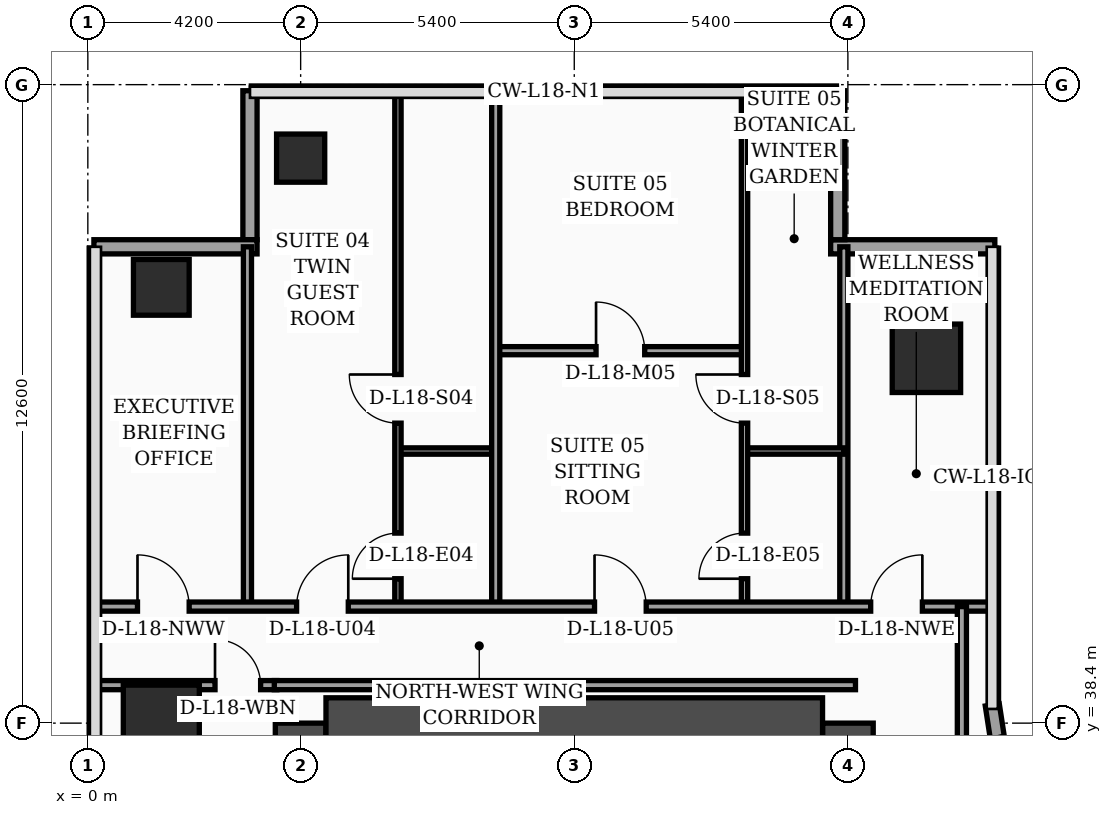
"""IFC4 building model, lengths in metres.
Left out: names, types, materials, properties, quantities, classifications, styles, units other than length and angle.
Written with IfcOpenShell. Run it as: python <this file> out.ifc"""

import sys

from ifc_helpers import new_model, si_unit, direction, frame, frame_2d, origin, origin_2d, place, context, subcontext, project, spatial, rectangle, hollow_rectangle, extrude, element, fill, save


model = new_model("IFC4")
c1 = context("Model", 3, precision=1e-05, world=origin(), true_north=direction((0.0, 1.0)))
c2 = subcontext(c1, "Body", "Model", "MODEL_VIEW")
j1 = project(units=[si_unit("LENGTHUNIT", "METRE"), si_unit("PLANEANGLEUNIT", "RADIAN")], contexts=[c1])
p1 = place(None, origin())
s1 = spatial("IfcSite", under=j1, at=p1, CompositionType="ELEMENT")
p2 = place(p1, origin())
s2 = spatial("IfcBuilding", under=s1, at=p2, CompositionType="ELEMENT")
p3 = place(p2, frame((0.0, 0.0, 77.4)))
s3 = spatial("IfcBuildingStorey", under=s2, at=p3, CompositionType="ELEMENT", Elevation=77.4)
p4 = place(p3, frame((4.2, 16.8, 0.0), z_axis=(0.0, 0.0, 1.0), x_axis=(0.0, 1.0, 0.0)))
e1 = element("IfcWall", 1, at=p4, inside=s3, PredefinedType="SHEAR", context=c2, shape_type="SweptSolid", body=[
    extrude(rectangle(XDim=21.6, YDim=1.0, at=frame_2d((10.8, 0.0))), origin(), (0.0, 0.0, 1.0), 3.56),
])
p5 = place(p3, frame((15.0, 16.8, 0.0), z_axis=(0.0, 0.0, 1.0), x_axis=(0.0, 1.0, 0.0)))
e2 = element("IfcWall", 2, at=p5, inside=s3, PredefinedType="SHEAR", context=c2, shape_type="SweptSolid", body=[
    extrude(rectangle(XDim=21.6, YDim=1.0, at=frame_2d((10.8, 0.0))), origin(), (0.0, 0.0, 1.0), 3.56),
])
p6 = place(p5, frame((8.65, 0.0, 0.0)))
e3 = element("IfcOpeningElement", 3, at=p6, cuts=e2, PredefinedType="OPENING", context=c2, shape_type="SweptSolid", body=[
    extrude(rectangle(XDim=1.1, YDim=2.2, at=frame_2d((0.55, 1.1))), frame((0.0, 0.51, 0.0), z_axis=(0.0, -1.0, 0.0), x_axis=(1.0, 0.0, 0.0)), (0.0, 0.0, 1.0), 1.02),
])
p7 = place(p5, frame((1.25, 0.0, 0.0)))
e4 = element("IfcOpeningElement", 4, at=p7, cuts=e2, PredefinedType="OPENING", context=c2, shape_type="SweptSolid", body=[
    extrude(rectangle(XDim=1.1, YDim=2.2, at=frame_2d((0.55, 1.1))), frame((0.0, 0.51, 0.0), z_axis=(0.0, -1.0, 0.0), x_axis=(1.0, 0.0, 0.0)), (0.0, 0.0, 1.0), 1.02),
])
p8 = place(p5, frame((3.8, 0.0, 0.0)))
e5 = element("IfcOpeningElement", 5, at=p8, cuts=e2, PredefinedType="OPENING", context=c2, shape_type="SweptSolid", body=[
    extrude(rectangle(XDim=1.1, YDim=2.2, at=frame_2d((0.55, 1.1))), frame((0.0, 0.51, 0.0), z_axis=(0.0, -1.0, 0.0), x_axis=(1.0, 0.0, 0.0)), (0.0, 0.0, 1.0), 1.02),
])
p9 = place(p5, frame((6.35, 0.0, 0.0)))
e6 = element("IfcOpeningElement", 6, at=p9, cuts=e2, PredefinedType="OPENING", context=c2, shape_type="SweptSolid", body=[
    extrude(rectangle(XDim=1.1, YDim=2.2, at=frame_2d((0.55, 1.1))), frame((0.0, 0.51, 0.0), z_axis=(0.0, -1.0, 0.0), x_axis=(1.0, 0.0, 0.0)), (0.0, 0.0, 1.0), 1.02),
])
p10 = place(p3, frame((4.7, 38.4, 0.0), z_axis=(0.0, 0.0, 1.0), x_axis=(1.0, 0.0, 0.0)))
e7 = element("IfcWall", 7, at=p10, inside=s3, PredefinedType="SHEAR", context=c2, shape_type="SweptSolid", body=[
    extrude(rectangle(XDim=9.8, YDim=1.0, at=frame_2d((4.9, 0.0))), origin(), (0.0, 0.0, 1.0), 3.56),
])
p11 = place(p3, frame((1.45, 38.4, 0.0), z_axis=(0.0, 0.0, 1.0), x_axis=(1.0, 0.0, 0.0)))
e8 = element("IfcColumn", 8, at=p11, inside=s3, PredefinedType="COLUMN", context=c2, shape_type="SweptSolid", body=[
    extrude(rectangle(XDim=1.5, YDim=1.5, at=origin_2d()), origin(), (0.0, 0.0, 1.0), 3.56),
])
p12 = place(p3, frame((1.45, 47.0, 0.0), z_axis=(0.0, 0.0, 1.0), x_axis=(1.0, 0.0, 0.0)))
e9 = element("IfcColumn", 9, at=p12, inside=s3, PredefinedType="COLUMN", context=c2, shape_type="SweptSolid", body=[
    extrude(hollow_rectangle(XDim=1.1, YDim=1.1, WallThickness=0.045, at=origin_2d()), origin(), (0.0, 0.0, 1.0), 3.56),
])
p13 = place(p3, frame((4.2, 49.55, 0.0), z_axis=(0.0, 0.0, 1.0), x_axis=(1.0, 0.0, 0.0)))
e10 = element("IfcColumn", 10, at=p13, inside=s3, PredefinedType="COLUMN", context=c2, shape_type="SweptSolid", body=[
    extrude(hollow_rectangle(XDim=0.95, YDim=0.95, WallThickness=0.04, at=origin_2d()), origin(), (0.0, 0.0, 1.0), 3.56),
])
p14 = place(p3, frame((16.55, 45.6, 0.0), z_axis=(0.0, 0.0, 1.0), x_axis=(1.0, 0.0, 0.0)))
e11 = element("IfcColumn", 11, at=p14, inside=s3, PredefinedType="COLUMN", context=c2, shape_type="SweptSolid", body=[
    extrude(rectangle(XDim=1.35, YDim=1.35, at=origin_2d()), origin(), (0.0, 0.0, 1.0), 3.56),
])
p15 = place(p3, frame((17.962, 38.03, 0.0), z_axis=(0.0, 0.0, 1.0), x_axis=(-0.15141125477, 0.988470855377, 0.0)))
e12 = element("IfcWall", 12, at=p15, inside=s3, PredefinedType="SOLIDWALL", context=c2, shape_type="SweptSolid", body=[
    extrude(rectangle(XDim=0.739, YDim=0.28, at=frame_2d((0.369, 0.0))), origin(), (0.0, 0.0, 1.0), 3.56),
])
p16 = place(p3, frame((17.9, 47.8, 0.0), z_axis=(0.0, 0.0, 1.0), x_axis=(-1.0, 0.0, 0.0)))
e13 = element("IfcWall", 13, at=p16, inside=s3, PredefinedType="SOLIDWALL", context=c2, shape_type="SweptSolid", body=[
    extrude(rectangle(XDim=3.24, YDim=0.28, at=frame_2d((1.62, 0.0))), origin(), (0.0, 0.0, 1.0), 3.56),
])
p17 = place(p3, frame((14.8, 47.94, 0.0), z_axis=(0.0, 0.0, 1.0), x_axis=(0.0, 1.0, 0.0)))
e14 = element("IfcWall", 14, at=p17, inside=s3, PredefinedType="SOLIDWALL", context=c2, shape_type="SweptSolid", body=[
    extrude(rectangle(XDim=2.94, YDim=0.28, at=frame_2d((1.47, 0.0))), origin(), (0.0, 0.0, 1.0), 3.56),
])
p18 = place(p3, frame((3.2, 50.88, 0.0), z_axis=(0.0, 0.0, 1.0), x_axis=(0.0, -1.0, 0.0)))
e15 = element("IfcWall", 15, at=p18, inside=s3, PredefinedType="SOLIDWALL", context=c2, shape_type="SweptSolid", body=[
    extrude(rectangle(XDim=2.94, YDim=0.28, at=frame_2d((1.47, 0.0))), origin(), (0.0, 0.0, 1.0), 3.04),
])
p19 = place(p3, frame((3.34, 47.8, 0.0), z_axis=(0.0, 0.0, 1.0), x_axis=(-1.0, 0.0, 0.0)))
e16 = element("IfcWall", 16, at=p19, inside=s3, PredefinedType="SOLIDWALL", context=c2, shape_type="SweptSolid", body=[
    extrude(rectangle(XDim=3.22, YDim=0.28, at=frame_2d((1.61, 0.0))), origin(), (0.0, 0.0, 1.0), 3.04),
])
p20 = place(p3, frame((0.08, 39.15, 0.0), z_axis=(0.0, 0.0, 1.0), x_axis=(1.0, 0.0, 0.0)))
e17 = element("IfcWall", 17, at=p20, inside=s3, PredefinedType="PARTITIONING", context=c2, shape_type="SweptSolid", body=[
    extrude(rectangle(XDim=3.65, YDim=0.18, at=frame_2d((1.825, 0.0))), origin(), (0.0, 0.0, 1.0), 2.84),
])
p21 = place(p20, frame((2.43, 0.0, 0.0)))
e18 = element("IfcOpeningElement", 18, at=p21, cuts=e17, PredefinedType="OPENING", context=c2, shape_type="SweptSolid", body=[
    extrude(rectangle(XDim=0.9, YDim=2.15, at=frame_2d((0.45, 1.075))), frame((0.0, 0.1, 0.0), z_axis=(0.0, -1.0, 0.0), x_axis=(1.0, 0.0, 0.0)), (0.0, 0.0, 1.0), 0.2),
])
p22 = place(p3, frame((3.15, 40.7, 0.0), z_axis=(0.0, 0.0, 1.0), x_axis=(0.0, 1.0, 0.0)))
e19 = element("IfcWall", 19, at=p22, inside=s3, PredefinedType="PARTITIONING", context=c2, shape_type="SweptSolid", body=[
    extrude(rectangle(XDim=7.1, YDim=0.16, at=frame_2d((3.55, 0.0))), origin(), (0.0, 0.0, 1.0), 3.14),
])
p23 = place(p3, frame((14.92, 40.7, 0.0), z_axis=(0.0, 0.0, 1.0), x_axis=(0.0, 1.0, 0.0)))
e20 = element("IfcWall", 20, at=p23, inside=s3, PredefinedType="PARTITIONING", context=c2, shape_type="SweptSolid", body=[
    extrude(rectangle(XDim=7.1, YDim=0.16, at=frame_2d((3.55, 0.0))), origin(), (0.0, 0.0, 1.0), 3.04),
])
p24 = place(p3, frame((6.12, 43.77, 0.0), z_axis=(0.0, 0.0, 1.0), x_axis=(1.0, 0.0, 0.0)))
e21 = element("IfcWall", 21, at=p24, inside=s3, PredefinedType="PARTITIONING", context=c2, shape_type="SweptSolid", body=[
    extrude(rectangle(XDim=1.93, YDim=0.125, at=frame_2d((0.965, 0.0))), origin(), (0.0, 0.0, 1.0), 3.56),
])
p25 = place(p3, frame((6.12, 40.7, 0.0), z_axis=(0.0, 0.0, 1.0), x_axis=(0.0, 1.0, 0.0)))
e22 = element("IfcWall", 22, at=p25, inside=s3, PredefinedType="PARTITIONING", context=c2, shape_type="SweptSolid", body=[
    extrude(rectangle(XDim=10.24, YDim=0.125, at=frame_2d((5.12, 0.0))), origin(), (0.0, 0.0, 1.0), 3.04),
])
p26 = place(p25, frame((0.55, 0.0, 0.0)))
e23 = element("IfcOpeningElement", 23, at=p26, cuts=e22, PredefinedType="OPENING", context=c2, shape_type="SweptSolid", body=[
    extrude(rectangle(XDim=0.9, YDim=2.15, at=frame_2d((0.45, 1.075))), frame((0.0, 0.073, 0.0), z_axis=(0.0, -1.0, 0.0), x_axis=(1.0, 0.0, 0.0)), (0.0, 0.0, 1.0), 0.145),
])
p27 = place(p25, frame((3.62, 0.0, 0.0)))
e24 = element("IfcOpeningElement", 24, at=p27, cuts=e22, PredefinedType="OPENING", context=c2, shape_type="SweptSolid", body=[
    extrude(rectangle(XDim=0.96, YDim=2.2, at=frame_2d((0.48, 1.1))), frame((0.0, 0.073, 0.0), z_axis=(0.0, -1.0, 0.0), x_axis=(1.0, 0.0, 0.0)), (0.0, 0.0, 1.0), 0.145),
])
p28 = place(p3, frame((12.96, 43.77, 0.0), z_axis=(0.0, 0.0, 1.0), x_axis=(1.0, 0.0, 0.0)))
e25 = element("IfcWall", 25, at=p28, inside=s3, PredefinedType="PARTITIONING", context=c2, shape_type="SweptSolid", body=[
    extrude(rectangle(XDim=1.96, YDim=0.125, at=frame_2d((0.98, 0.0))), origin(), (0.0, 0.0, 1.0), 3.56),
])
p29 = place(p3, frame((8.05, 45.75, 0.0), z_axis=(0.0, 0.0, 1.0), x_axis=(1.0, 0.0, 0.0)))
e26 = element("IfcWall", 26, at=p29, inside=s3, PredefinedType="PARTITIONING", context=c2, shape_type="SweptSolid", body=[
    extrude(rectangle(XDim=4.91, YDim=0.16, at=frame_2d((2.455, 0.0))), origin(), (0.0, 0.0, 1.0), 3.56),
])
p30 = place(p29, frame((1.98, 0.0, 0.0)))
e27 = element("IfcOpeningElement", 27, at=p30, cuts=e26, PredefinedType="OPENING", context=c2, shape_type="SweptSolid", body=[
    extrude(rectangle(XDim=0.96, YDim=2.2, at=frame_2d((0.48, 1.1))), frame((0.0, 0.09, 0.0), z_axis=(0.0, -1.0, 0.0), x_axis=(1.0, 0.0, 0.0)), (0.0, 0.0, 1.0), 0.18),
])
p31 = place(p3, frame((12.96, 40.7, 0.0), z_axis=(0.0, 0.0, 1.0), x_axis=(0.0, 1.0, 0.0)))
e28 = element("IfcWall", 28, at=p31, inside=s3, PredefinedType="PARTITIONING", context=c2, shape_type="SweptSolid", body=[
    extrude(rectangle(XDim=10.24, YDim=0.125, at=frame_2d((5.12, 0.0))), origin(), (0.0, 0.0, 1.0), 3.04),
])
p32 = place(p31, frame((0.55, 0.0, 0.0)))
e29 = element("IfcOpeningElement", 29, at=p32, cuts=e28, PredefinedType="OPENING", context=c2, shape_type="SweptSolid", body=[
    extrude(rectangle(XDim=0.9, YDim=2.15, at=frame_2d((0.45, 1.075))), frame((0.0, 0.073, 0.0), z_axis=(0.0, -1.0, 0.0), x_axis=(1.0, 0.0, 0.0)), (0.0, 0.0, 1.0), 0.145),
])
p33 = place(p31, frame((3.62, 0.0, 0.0)))
e30 = element("IfcOpeningElement", 30, at=p33, cuts=e28, PredefinedType="OPENING", context=c2, shape_type="SweptSolid", body=[
    extrude(rectangle(XDim=0.96, YDim=2.2, at=frame_2d((0.48, 1.1))), frame((0.0, 0.073, 0.0), z_axis=(0.0, -1.0, 0.0), x_axis=(1.0, 0.0, 0.0)), (0.0, 0.0, 1.0), 0.145),
])
p34 = place(p3, frame((8.05, 40.7, 0.0), z_axis=(0.0, 0.0, 1.0), x_axis=(0.0, 1.0, 0.0)))
e31 = element("IfcWall", 31, at=p34, inside=s3, PredefinedType="PARTITIONING", context=c2, shape_type="SweptSolid", body=[
    extrude(rectangle(XDim=10.24, YDim=0.16, at=frame_2d((5.12, 0.0))), origin(), (0.0, 0.0, 1.0), 3.04),
])
p35 = place(p3, frame((0.08, 40.7, 0.0), z_axis=(0.0, 0.0, 1.0), x_axis=(1.0, 0.0, 0.0)))
e32 = element("IfcWall", 32, at=p35, inside=s3, PredefinedType="PARTITIONING", context=c2, shape_type="SweptSolid", body=[
    extrude(rectangle(XDim=17.77, YDim=0.18, at=frame_2d((8.885, 0.0))), origin(), (0.0, 0.0, 1.0), 2.84),
])
p36 = place(p35, frame((0.9, 0.0, 0.0)))
e33 = element("IfcOpeningElement", 33, at=p36, cuts=e32, PredefinedType="OPENING", context=c2, shape_type="SweptSolid", body=[
    extrude(rectangle(XDim=1.02, YDim=2.2, at=frame_2d((0.51, 1.1))), frame((0.0, 0.1, 0.0), z_axis=(0.0, -1.0, 0.0), x_axis=(1.0, 0.0, 0.0)), (0.0, 0.0, 1.0), 0.2),
])
p37 = place(p35, frame((4.04, 0.0, 0.0)))
e34 = element("IfcOpeningElement", 34, at=p37, cuts=e32, PredefinedType="OPENING", context=c2, shape_type="SweptSolid", body=[
    extrude(rectangle(XDim=1.02, YDim=2.2, at=frame_2d((0.51, 1.1))), frame((0.0, 0.1, 0.0), z_axis=(0.0, -1.0, 0.0), x_axis=(1.0, 0.0, 0.0)), (0.0, 0.0, 1.0), 0.2),
])
p38 = place(p35, frame((9.92, 0.0, 0.0)))
e35 = element("IfcOpeningElement", 35, at=p38, cuts=e32, PredefinedType="OPENING", context=c2, shape_type="SweptSolid", body=[
    extrude(rectangle(XDim=1.02, YDim=2.2, at=frame_2d((0.51, 1.1))), frame((0.0, 0.1, 0.0), z_axis=(0.0, -1.0, 0.0), x_axis=(1.0, 0.0, 0.0)), (0.0, 0.0, 1.0), 0.2),
])
p39 = place(p35, frame((15.37, 0.0, 0.0)))
e36 = element("IfcOpeningElement", 36, at=p39, cuts=e32, PredefinedType="OPENING", context=c2, shape_type="SweptSolid", body=[
    extrude(rectangle(XDim=1.02, YDim=2.2, at=frame_2d((0.51, 1.1))), frame((0.0, 0.1, 0.0), z_axis=(0.0, -1.0, 0.0), x_axis=(1.0, 0.0, 0.0)), (0.0, 0.0, 1.0), 0.2),
])
p40 = place(p3, frame((17.25, 24.3, 0.0), z_axis=(0.0, 0.0, 1.0), x_axis=(0.0, 1.0, 0.0)))
e37 = element("IfcWall", 37, at=p40, inside=s3, PredefinedType="PARTITIONING", context=c2, shape_type="SweptSolid", body=[
    extrude(rectangle(XDim=16.4, YDim=0.18, at=frame_2d((8.2, 0.0))), origin(), (0.0, 0.0, 1.0), 2.84),
])
p41 = place(p3, frame((3.68, 39.15, 0.0), z_axis=(0.0, 0.0, 1.0), x_axis=(1.0, 0.0, 0.0)))
e38 = element("IfcWall", 38, at=p41, inside=s3, PredefinedType="PARTITIONING", context=c2, shape_type="SweptSolid", body=[
    extrude(rectangle(XDim=11.47, YDim=0.18, at=frame_2d((5.735, 0.0))), origin(), (0.0, 0.0, 1.0), 2.84),
])
p42 = place(p21, origin())
e39 = element("IfcDoor", 39, at=p42, inside=s3, OperationType="SINGLE_SWING_LEFT", PredefinedType="DOOR", context=c2, shape_type="SweptSolid", body=[
    extrude(rectangle(XDim=0.9, YDim=2.15, at=frame_2d((0.45, 1.075))), frame((0.0, 0.025, 0.0), z_axis=(0.0, -1.0, 0.0), x_axis=(1.0, 0.0, 0.0)), (0.0, 0.0, 1.0), 0.05),
])
fill(e18, e39)
p43 = place(p26, origin())
e40 = element("IfcDoor", 40, at=p43, inside=s3, OperationType="SINGLE_SWING_LEFT", PredefinedType="DOOR", context=c2, shape_type="SweptSolid", body=[
    extrude(rectangle(XDim=0.9, YDim=2.15, at=frame_2d((0.45, 1.075))), frame((0.0, 0.025, 0.0), z_axis=(0.0, -1.0, 0.0), x_axis=(1.0, 0.0, 0.0)), (0.0, 0.0, 1.0), 0.05),
])
fill(e23, e40)
p44 = place(p27, origin())
e41 = element("IfcDoor", 41, at=p44, inside=s3, OperationType="SINGLE_SWING_RIGHT", PredefinedType="DOOR", context=c2, shape_type="SweptSolid", body=[
    extrude(rectangle(XDim=0.96, YDim=2.2, at=frame_2d((0.48, 1.1))), frame((0.0, 0.025, 0.0), z_axis=(0.0, -1.0, 0.0), x_axis=(1.0, 0.0, 0.0)), (0.0, 0.0, 1.0), 0.05),
])
fill(e24, e41)
p45 = place(p30, origin())
e42 = element("IfcDoor", 42, at=p45, inside=s3, OperationType="SINGLE_SWING_LEFT", PredefinedType="DOOR", context=c2, shape_type="SweptSolid", body=[
    extrude(rectangle(XDim=0.96, YDim=2.2, at=frame_2d((0.48, 1.1))), frame((0.0, 0.025, 0.0), z_axis=(0.0, -1.0, 0.0), x_axis=(1.0, 0.0, 0.0)), (0.0, 0.0, 1.0), 0.05),
])
fill(e27, e42)
p46 = place(p32, origin())
e43 = element("IfcDoor", 43, at=p46, inside=s3, OperationType="SINGLE_SWING_LEFT", PredefinedType="DOOR", context=c2, shape_type="SweptSolid", body=[
    extrude(rectangle(XDim=0.9, YDim=2.15, at=frame_2d((0.45, 1.075))), frame((0.0, 0.025, 0.0), z_axis=(0.0, -1.0, 0.0), x_axis=(1.0, 0.0, 0.0)), (0.0, 0.0, 1.0), 0.05),
])
fill(e29, e43)
p47 = place(p33, origin())
e44 = element("IfcDoor", 44, at=p47, inside=s3, OperationType="SINGLE_SWING_RIGHT", PredefinedType="DOOR", context=c2, shape_type="SweptSolid", body=[
    extrude(rectangle(XDim=0.96, YDim=2.2, at=frame_2d((0.48, 1.1))), frame((0.0, 0.025, 0.0), z_axis=(0.0, -1.0, 0.0), x_axis=(1.0, 0.0, 0.0)), (0.0, 0.0, 1.0), 0.05),
])
fill(e30, e44)
p48 = place(p36, origin())
e45 = element("IfcDoor", 45, at=p48, inside=s3, OperationType="SINGLE_SWING_LEFT", PredefinedType="DOOR", context=c2, shape_type="SweptSolid", body=[
    extrude(rectangle(XDim=1.02, YDim=2.2, at=frame_2d((0.51, 1.1))), frame((0.0, 0.025, 0.0), z_axis=(0.0, -1.0, 0.0), x_axis=(1.0, 0.0, 0.0)), (0.0, 0.0, 1.0), 0.05),
])
fill(e33, e45)
p49 = place(p37, origin())
e46 = element("IfcDoor", 46, at=p49, inside=s3, OperationType="SINGLE_SWING_RIGHT", PredefinedType="DOOR", context=c2, shape_type="SweptSolid", body=[
    extrude(rectangle(XDim=1.02, YDim=2.2, at=frame_2d((0.51, 1.1))), frame((0.0, 0.025, 0.0), z_axis=(0.0, -1.0, 0.0), x_axis=(1.0, 0.0, 0.0)), (0.0, 0.0, 1.0), 0.05),
])
fill(e34, e46)
p50 = place(p38, origin())
e47 = element("IfcDoor", 47, at=p50, inside=s3, OperationType="SINGLE_SWING_LEFT", PredefinedType="DOOR", context=c2, shape_type="SweptSolid", body=[
    extrude(rectangle(XDim=1.02, YDim=2.2, at=frame_2d((0.51, 1.1))), frame((0.0, 0.025, 0.0), z_axis=(0.0, -1.0, 0.0), x_axis=(1.0, 0.0, 0.0)), (0.0, 0.0, 1.0), 0.05),
])
fill(e35, e47)
p51 = place(p39, origin())
e48 = element("IfcDoor", 48, at=p51, inside=s3, OperationType="SINGLE_SWING_RIGHT", PredefinedType="DOOR", context=c2, shape_type="SweptSolid", body=[
    extrude(rectangle(XDim=1.02, YDim=2.2, at=frame_2d((0.51, 1.1))), frame((0.0, 0.025, 0.0), z_axis=(0.0, -1.0, 0.0), x_axis=(1.0, 0.0, 0.0)), (0.0, 0.0, 1.0), 0.05),
])
fill(e36, e48)
save(model, sys.argv[1])
